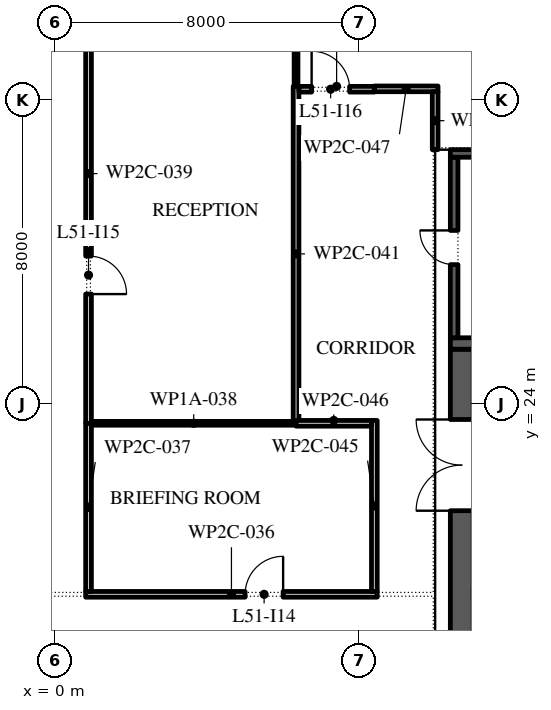
"""IFC4 building model, lengths in metres.
Left out: names, types, materials, properties, quantities, classifications, styles, units other than length and angle.
Written with IfcOpenShell. Run it as: python <this file> out.ifc"""

import sys

from ifc_helpers import new_model, si_unit, direction, frame, frame_2d, origin, place, context, subcontext, project, spatial, rectangle, extrude, element, fill, save


model = new_model("IFC4")
c1 = context("Model", 3, precision=1e-05, world=origin(), true_north=direction((0.0, 1.0)))
c2 = subcontext(c1, "Body", "Model", "MODEL_VIEW")
j1 = project(units=[si_unit("LENGTHUNIT", "METRE"), si_unit("PLANEANGLEUNIT", "RADIAN")], contexts=[c1])
p1 = place(None, origin())
s1 = spatial("IfcSite", under=j1, at=p1, CompositionType="ELEMENT")
p2 = place(p1, origin())
s2 = spatial("IfcBuilding", under=s1, at=p2, CompositionType="ELEMENT")
p3 = place(p2, frame((0.0, 0.0, 237.0)))
s3 = spatial("IfcBuildingStorey", under=s2, at=p3, CompositionType="ELEMENT", Elevation=237.0)
p4 = place(p3, frame((10.7, -2.45, 0.0), z_axis=(0.0, 0.0, 1.0), x_axis=(0.0, 1.0, 0.0)))
e1 = element("IfcWall", 1, at=p4, inside=s3, PredefinedType="SHEAR", context=c2, shape_type="SweptSolid", body=[
    extrude(rectangle(XDim=27.9, YDim=0.6, at=frame_2d((13.95, 0.0))), origin(), (0.0, 0.0, 1.0), 5.8),
])
p5 = place(p4, frame((23.65, 0.0, 0.0)))
e2 = element("IfcOpeningElement", 2, at=p5, cuts=e1, PredefinedType="OPENING", context=c2, shape_type="SweptSolid", body=[
    extrude(rectangle(XDim=2.4, YDim=2.1, at=frame_2d((1.2, 1.05))), frame((0.0, 0.31, 0.0), z_axis=(0.0, -1.0, 0.0), x_axis=(1.0, 0.0, 0.0)), (0.0, 0.0, 1.0), 0.62),
])
p6 = place(p4, frame((1.387, 0.0, 0.0)))
e3 = element("IfcOpeningElement", 3, at=p6, cuts=e1, PredefinedType="OPENING", context=c2, shape_type="SweptSolid", body=[
    extrude(rectangle(XDim=0.9, YDim=2.1, at=frame_2d((0.45, 1.05))), frame((0.0, 0.31, 0.0), z_axis=(0.0, -1.0, 0.0), x_axis=(1.0, 0.0, 0.0)), (0.0, 0.0, 1.0), 0.62),
])
p7 = place(p4, frame((4.562, 0.0, 0.0)))
e4 = element("IfcOpeningElement", 4, at=p7, cuts=e1, PredefinedType="OPENING", context=c2, shape_type="SweptSolid", body=[
    extrude(rectangle(XDim=1.0, YDim=2.1, at=frame_2d((0.5, 1.05))), frame((0.0, 0.31, 0.0), z_axis=(0.0, -1.0, 0.0), x_axis=(1.0, 0.0, 0.0)), (0.0, 0.0, 1.0), 0.62),
])
p8 = place(p3, frame((10.4, 25.6, 0.0), z_axis=(0.0, 0.0, 1.0), x_axis=(1.0, 0.0, 0.0)))
e5 = element("IfcWall", 5, at=p8, inside=s3, PredefinedType="SHEAR", context=c2, shape_type="SweptSolid", body=[
    extrude(rectangle(XDim=11.2, YDim=0.3, at=frame_2d((5.6, 0.0))), origin(), (0.0, 0.0, 1.0), 5.8),
])
p9 = place(p3, frame((10.5, 25.75, 0.0), z_axis=(0.0, 0.0, 1.0), x_axis=(0.0, 1.0, 0.0)))
e6 = element("IfcWall", 6, at=p9, inside=s3, PredefinedType="SHEAR", context=c2, shape_type="SweptSolid", body=[
    extrude(rectangle(XDim=4.75, YDim=0.2, at=frame_2d((2.375, 0.0))), origin(), (0.0, 0.0, 1.0), 5.8),
])
p10 = place(p9, frame((1.925, 0.0, 0.0)))
e7 = element("IfcOpeningElement", 7, at=p10, cuts=e6, PredefinedType="OPENING", context=c2, shape_type="SweptSolid", body=[
    extrude(rectangle(XDim=0.9, YDim=2.1, at=frame_2d((0.45, 1.05))), frame((0.0, 0.11, 0.0), z_axis=(0.0, -1.0, 0.0), x_axis=(1.0, 0.0, 0.0)), (0.0, 0.0, 1.0), 0.22),
])
p11 = place(p3, frame((10.4, 30.6, 0.0), z_axis=(0.0, 0.0, 1.0), x_axis=(1.0, 0.0, 0.0)))
e8 = element("IfcWall", 8, at=p11, inside=s3, PredefinedType="SHEAR", context=c2, shape_type="SweptSolid", body=[
    extrude(rectangle(XDim=11.2, YDim=0.2, at=frame_2d((5.6, 0.0))), origin(), (0.0, 0.0, 1.0), 5.8),
])
p12 = place(p3, frame((0.805, 19.0, 0.0), z_axis=(0.0, 0.0, 1.0), x_axis=(1.0, 0.0, 0.0)))
e9 = element("IfcWall", 9, at=p12, inside=s3, PredefinedType="PARTITIONING", context=c2, shape_type="SweptSolid", body=[
    extrude(rectangle(XDim=7.67, YDim=0.15, at=frame_2d((3.835, 0.0))), origin(), (0.0, 0.0, 1.0), 5.8),
])
p13 = place(p12, frame((4.195, 0.0, 0.0)))
e10 = element("IfcOpeningElement", 10, at=p13, cuts=e9, PredefinedType="OPENING", context=c2, shape_type="SweptSolid", body=[
    extrude(rectangle(XDim=1.0, YDim=2.1, at=frame_2d((0.5, 1.05))), frame((0.0, 0.085, 0.0), z_axis=(0.0, -1.0, 0.0), x_axis=(1.0, 0.0, 0.0)), (0.0, 0.0, 1.0), 0.17),
])
p14 = place(p3, frame((0.88, 23.5, 0.0), z_axis=(0.0, 0.0, 1.0), x_axis=(0.0, -1.0, 0.0)))
e11 = element("IfcWall", 11, at=p14, inside=s3, PredefinedType="PARTITIONING", context=c2, shape_type="SweptSolid", body=[
    extrude(rectangle(XDim=4.425, YDim=0.15, at=frame_2d((2.212, 0.0))), origin(), (0.0, 0.0, 1.0), 5.8),
])
p15 = place(p3, frame((0.955, 23.5, 0.0), z_axis=(0.0, 0.0, 1.0), x_axis=(1.0, 0.0, 0.0)))
e12 = element("IfcWall", 12, at=p15, inside=s3, PredefinedType="PARTITIONING", context=c2, shape_type="SweptSolid", body=[
    extrude(rectangle(XDim=5.385, YDim=0.1, at=frame_2d((2.692, 0.0))), origin(), (0.0, 0.0, 1.0), 5.8),
])
p16 = place(p3, frame((0.88, 36.64, 0.0), z_axis=(0.0, 0.0, 1.0), x_axis=(0.0, -1.0, 0.0)))
e13 = element("IfcWall", 13, at=p16, inside=s3, PredefinedType="PARTITIONING", context=c2, shape_type="SweptSolid", body=[
    extrude(rectangle(XDim=13.14, YDim=0.15, at=frame_2d((6.57, 0.0))), origin(), (0.0, 0.0, 1.0), 5.8),
])
p17 = place(p16, frame((8.74, 0.0, 0.0)))
e14 = element("IfcOpeningElement", 14, at=p17, cuts=e13, PredefinedType="OPENING", context=c2, shape_type="SweptSolid", body=[
    extrude(rectangle(XDim=1.0, YDim=2.1, at=frame_2d((0.5, 1.05))), frame((0.0, 0.085, 0.0), z_axis=(0.0, -1.0, 0.0), x_axis=(1.0, 0.0, 0.0)), (0.0, 0.0, 1.0), 0.17),
])
p18 = place(p3, frame((6.34, 23.55, 0.0), z_axis=(0.0, 0.0, 1.0), x_axis=(0.0, 1.0, 0.0)))
e15 = element("IfcWall", 15, at=p18, inside=s3, PredefinedType="PARTITIONING", context=c2, shape_type="SweptSolid", body=[
    extrude(rectangle(XDim=8.815, YDim=0.15, at=frame_2d((4.407, 0.0))), origin(), (0.0, 0.0, 1.0), 5.8),
])
p19 = place(p3, frame((6.415, 32.29, 0.0), z_axis=(0.0, 0.0, 1.0), x_axis=(1.0, 0.0, 0.0)))
e16 = element("IfcWall", 16, at=p19, inside=s3, PredefinedType="PARTITIONING", context=c2, shape_type="SweptSolid", body=[
    extrude(rectangle(XDim=1.985, YDim=0.15, at=frame_2d((0.992, 0.0))), origin(), (0.0, 0.0, 1.0), 5.8),
])
p20 = place(p19, frame((0.335, 0.0, 0.0)))
e17 = element("IfcOpeningElement", 17, at=p20, cuts=e16, PredefinedType="OPENING", context=c2, shape_type="SweptSolid", body=[
    extrude(rectangle(XDim=1.0, YDim=2.1, at=frame_2d((0.5, 1.05))), frame((0.0, 0.085, 0.0), z_axis=(0.0, -1.0, 0.0), x_axis=(1.0, 0.0, 0.0)), (0.0, 0.0, 1.0), 0.17),
])
p21 = place(p3, frame((6.34, 36.54, 0.0), z_axis=(0.0, 0.0, 1.0), x_axis=(0.0, -1.0, 0.0)))
e18 = element("IfcWall", 18, at=p21, inside=s3, PredefinedType="PARTITIONING", context=c2, shape_type="SweptSolid", body=[
    extrude(rectangle(XDim=4.175, YDim=0.1, at=frame_2d((2.087, 0.0))), origin(), (0.0, 0.0, 1.0), 5.8),
])
p22 = place(p3, frame((8.4, 19.075, 0.0), z_axis=(0.0, 0.0, 1.0), x_axis=(0.0, 1.0, 0.0)))
e19 = element("IfcWall", 19, at=p22, inside=s3, PredefinedType="PARTITIONING", context=c2, shape_type="SweptSolid", body=[
    extrude(rectangle(XDim=4.5, YDim=0.15, at=frame_2d((2.25, 0.0))), origin(), (0.0, 0.0, 1.0), 5.8),
])
p23 = place(p3, frame((8.325, 23.5, 0.0), z_axis=(0.0, 0.0, 1.0), x_axis=(-1.0, 0.0, 0.0)))
e20 = element("IfcWall", 20, at=p23, inside=s3, PredefinedType="PARTITIONING", context=c2, shape_type="SweptSolid", body=[
    extrude(rectangle(XDim=1.985, YDim=0.15, at=frame_2d((0.992, 0.0))), origin(), (0.0, 0.0, 1.0), 5.8),
])
p24 = place(p3, frame((8.4, 32.3, 0.0), z_axis=(0.0, 0.0, 1.0), x_axis=(1.0, 0.0, 0.0)))
e21 = element("IfcWall", 21, at=p24, inside=s3, PredefinedType="PARTITIONING", context=c2, shape_type="SweptSolid", body=[
    extrude(rectangle(XDim=1.675, YDim=0.15, at=frame_2d((0.837, 0.0))), origin(), (0.0, 0.0, 1.0), 5.8),
])
p25 = place(p3, frame((10.0, 32.225, 0.0), z_axis=(0.0, 0.0, 1.0), x_axis=(0.0, -1.0, 0.0)))
e22 = element("IfcWall", 22, at=p25, inside=s3, PredefinedType="PARTITIONING", context=c2, shape_type="SweptSolid", body=[
    extrude(rectangle(XDim=1.525, YDim=0.15, at=frame_2d((0.763, 0.0))), origin(), (0.0, 0.0, 1.0), 4.964),
])
p26 = place(p5, origin())
e23 = element("IfcDoor", 23, at=p26, inside=s3, OperationType="DOUBLE_DOOR_SINGLE_SWING", PredefinedType="DOOR", context=c2, shape_type="SweptSolid", body=[
    extrude(rectangle(XDim=2.4, YDim=2.1, at=frame_2d((1.2, 1.05))), frame((0.0, 0.025, 0.0), z_axis=(0.0, -1.0, 0.0), x_axis=(1.0, 0.0, 0.0)), (0.0, 0.0, 1.0), 0.05),
])
fill(e2, e23)
p27 = place(p10, origin())
e24 = element("IfcDoor", 24, at=p27, inside=s3, OperationType="SINGLE_SWING_LEFT", PredefinedType="DOOR", context=c2, shape_type="SweptSolid", body=[
    extrude(rectangle(XDim=0.9, YDim=2.1, at=frame_2d((0.45, 1.05))), frame((0.0, -0.05, 0.0), z_axis=(0.0, -1.0, 0.0), x_axis=(1.0, 0.0, 0.0)), (0.0, 0.0, 1.0), 0.05),
])
fill(e7, e24)
p28 = place(p13, origin())
e25 = element("IfcDoor", 25, at=p28, inside=s3, OperationType="SINGLE_SWING_LEFT", PredefinedType="DOOR", context=c2, shape_type="SweptSolid", body=[
    extrude(rectangle(XDim=1.0, YDim=2.1, at=frame_2d((0.5, 1.05))), frame((0.0, 0.025, 0.0), z_axis=(0.0, -1.0, 0.0), x_axis=(1.0, 0.0, 0.0)), (0.0, 0.0, 1.0), 0.05),
])
fill(e10, e25)
p29 = place(p17, origin())
e26 = element("IfcDoor", 26, at=p29, inside=s3, OperationType="SINGLE_SWING_LEFT", PredefinedType="DOOR", context=c2, shape_type="SweptSolid", body=[
    extrude(rectangle(XDim=1.0, YDim=2.1, at=frame_2d((0.5, 1.05))), frame((0.0, 0.025, 0.0), z_axis=(0.0, -1.0, 0.0), x_axis=(1.0, 0.0, 0.0)), (0.0, 0.0, 1.0), 0.05),
])
fill(e14, e26)
p30 = place(p20, origin())
e27 = element("IfcDoor", 27, at=p30, inside=s3, OperationType="SINGLE_SWING_RIGHT", PredefinedType="DOOR", context=c2, shape_type="SweptSolid", body=[
    extrude(rectangle(XDim=1.0, YDim=2.1, at=frame_2d((0.5, 1.05))), frame((0.0, 0.025, 0.0), z_axis=(0.0, -1.0, 0.0), x_axis=(1.0, 0.0, 0.0)), (0.0, 0.0, 1.0), 0.05),
])
fill(e17, e27)
save(model, sys.argv[1])
